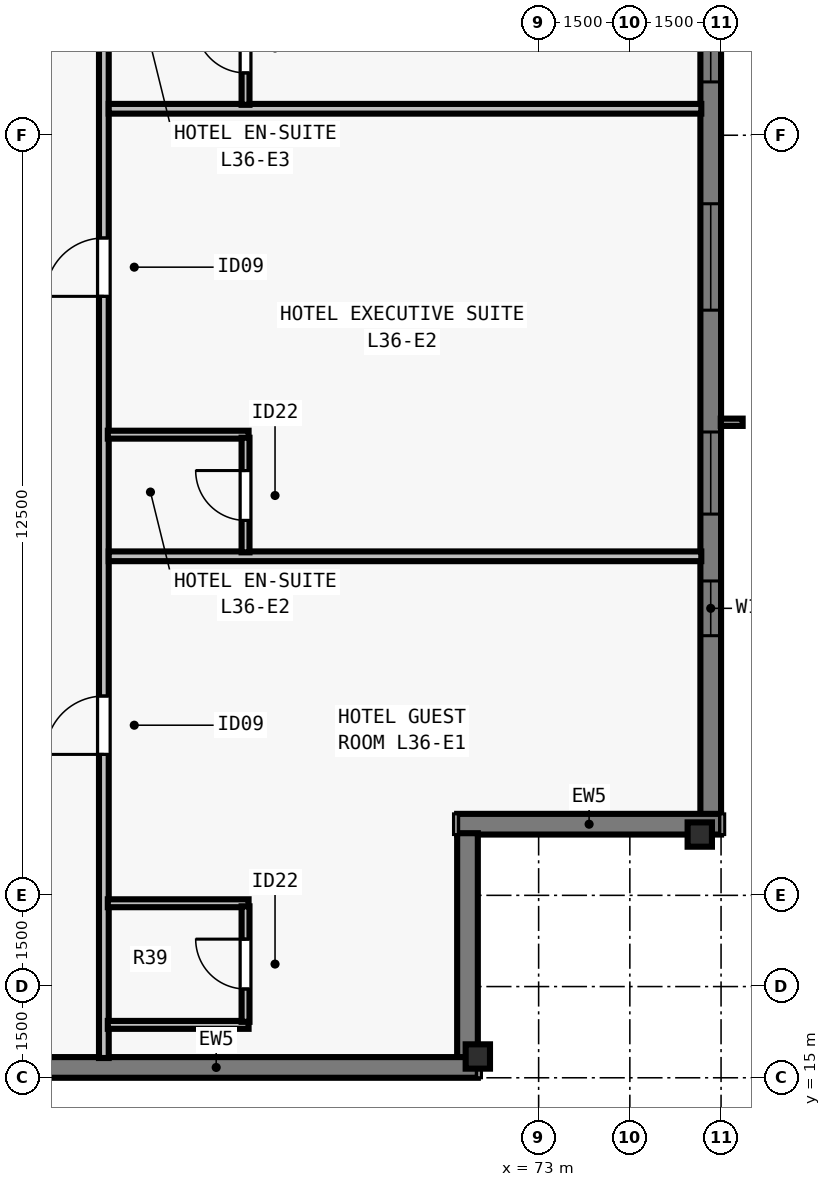
"""IFC4 building model, lengths in metres.
Left out: names, types, materials, properties, quantities, classifications, styles, units other than length and angle.
Written with IfcOpenShell. Run it as: python <this file> out.ifc"""

import sys

from ifc_helpers import new_model, si_unit, direction, frame, frame_2d, origin, origin_2d, place, context, subcontext, project, spatial, rectangle, i_section, extrude, element, fill, save


model = new_model("IFC4")
c1 = context("Model", 3, precision=1e-05, world=origin(), true_north=direction((0.0, 1.0)))
c2 = subcontext(c1, "Body", "Model", "MODEL_VIEW")
j1 = project(units=[si_unit("LENGTHUNIT", "METRE"), si_unit("PLANEANGLEUNIT", "RADIAN")], contexts=[c1])
p1 = place(None, origin())
s1 = spatial("IfcSite", under=j1, at=p1, CompositionType="ELEMENT")
p2 = place(p1, origin())
s2 = spatial("IfcBuilding", under=s1, at=p2, CompositionType="ELEMENT")
p3 = place(p2, frame((0.0, 0.0, 134.0)))
s3 = spatial("IfcBuildingStorey", under=s2, at=p3, CompositionType="ELEMENT", Elevation=134.0)
for number, where, z_axis, x_axis in (
    (1, (72.0, 15.35, 0.0), (0.0, 0.0, 1.0), (1.0, 0.0, 0.0)),
    (2, (75.65, 19.0, 0.0), (0.0, 0.0, 1.0), (0.0, 1.0, 0.0)),
):
    element("IfcColumn", number, at=place(p3, frame(where, z_axis=z_axis, x_axis=x_axis)), inside=s3, PredefinedType="COLUMN", context=c2, shape_type="SweptSolid", body=[
        extrude(i_section(OverallWidth=0.4, OverallDepth=0.4, WebThickness=0.022, FlangeThickness=0.036, at=origin_2d()), origin(), (0.0, 0.0, 1.0), 3.5),
    ])
p4 = place(p3, frame((75.83, 59.0, 0.0), z_axis=(0.0, 0.0, 1.0), x_axis=(0.0, -1.0, 0.0)))
e3 = element("IfcWall", 3, at=p4, inside=s3, PredefinedType="SOLIDWALL", context=c2, shape_type="SweptSolid", body=[
    extrude(rectangle(XDim=39.682, YDim=0.34, at=frame_2d((19.841, 0.0))), origin(), (0.0, 0.0, 1.0), 3.28),
])
p5 = place(p4, frame((4.952, 0.0, 0.8)))
e4 = element("IfcOpeningElement", 4, at=p5, cuts=e3, PredefinedType="OPENING", context=c2, shape_type="SweptSolid", body=[
    extrude(rectangle(XDim=1.35, YDim=1.66, at=frame_2d((0.675, 0.83))), frame((0.0, 0.18, 0.0), z_axis=(0.0, -1.0, 0.0), x_axis=(1.0, 0.0, 0.0)), (0.0, 0.0, 1.0), 0.36),
])
p6 = place(p4, frame((8.305, 0.0, 0.8)))
e5 = element("IfcOpeningElement", 5, at=p6, cuts=e3, PredefinedType="OPENING", context=c2, shape_type="SweptSolid", body=[
    extrude(rectangle(XDim=1.75, YDim=1.66, at=frame_2d((0.875, 0.83))), frame((0.0, 0.18, 0.0), z_axis=(0.0, -1.0, 0.0), x_axis=(1.0, 0.0, 0.0)), (0.0, 0.0, 1.0), 0.36),
])
p7 = place(p4, frame((12.909, 0.0, 0.8)))
e6 = element("IfcOpeningElement", 6, at=p7, cuts=e3, PredefinedType="OPENING", context=c2, shape_type="SweptSolid", body=[
    extrude(rectangle(XDim=1.35, YDim=1.66, at=frame_2d((0.675, 0.83))), frame((0.0, 0.18, 0.0), z_axis=(0.0, -1.0, 0.0), x_axis=(1.0, 0.0, 0.0)), (0.0, 0.0, 1.0), 0.36),
])
p8 = place(p4, frame((16.262, 0.0, 0.8)))
e7 = element("IfcOpeningElement", 7, at=p8, cuts=e3, PredefinedType="OPENING", context=c2, shape_type="SweptSolid", body=[
    extrude(rectangle(XDim=1.75, YDim=1.66, at=frame_2d((0.875, 0.83))), frame((0.0, 0.18, 0.0), z_axis=(0.0, -1.0, 0.0), x_axis=(1.0, 0.0, 0.0)), (0.0, 0.0, 1.0), 0.36),
])
p9 = place(p4, frame((20.016, 0.0, 0.8)))
e8 = element("IfcOpeningElement", 8, at=p9, cuts=e3, PredefinedType="OPENING", context=c2, shape_type="SweptSolid", body=[
    extrude(rectangle(XDim=1.35, YDim=1.66, at=frame_2d((0.675, 0.83))), frame((0.0, 0.18, 0.0), z_axis=(0.0, -1.0, 0.0), x_axis=(1.0, 0.0, 0.0)), (0.0, 0.0, 1.0), 0.36),
])
p10 = place(p4, frame((22.07, 0.0, 0.8)))
e9 = element("IfcOpeningElement", 9, at=p10, cuts=e3, PredefinedType="OPENING", context=c2, shape_type="SweptSolid", body=[
    extrude(rectangle(XDim=1.75, YDim=1.66, at=frame_2d((0.875, 0.83))), frame((0.0, 0.18, 0.0), z_axis=(0.0, -1.0, 0.0), x_axis=(1.0, 0.0, 0.0)), (0.0, 0.0, 1.0), 0.36),
])
p11 = place(p4, frame((26.273, 0.0, 0.8)))
e10 = element("IfcOpeningElement", 10, at=p11, cuts=e3, PredefinedType="OPENING", context=c2, shape_type="SweptSolid", body=[
    extrude(rectangle(XDim=1.35, YDim=1.66, at=frame_2d((0.675, 0.83))), frame((0.0, 0.18, 0.0), z_axis=(0.0, -1.0, 0.0), x_axis=(1.0, 0.0, 0.0)), (0.0, 0.0, 1.0), 0.36),
])
p12 = place(p4, frame((29.627, 0.0, 0.8)))
e11 = element("IfcOpeningElement", 11, at=p12, cuts=e3, PredefinedType="OPENING", context=c2, shape_type="SweptSolid", body=[
    extrude(rectangle(XDim=1.75, YDim=1.66, at=frame_2d((0.875, 0.83))), frame((0.0, 0.18, 0.0), z_axis=(0.0, -1.0, 0.0), x_axis=(1.0, 0.0, 0.0)), (0.0, 0.0, 1.0), 0.36),
])
p13 = place(p4, frame((33.38, 0.0, 0.8)))
e12 = element("IfcOpeningElement", 12, at=p13, cuts=e3, PredefinedType="OPENING", context=c2, shape_type="SweptSolid", body=[
    extrude(rectangle(XDim=1.35, YDim=1.66, at=frame_2d((0.675, 0.83))), frame((0.0, 0.18, 0.0), z_axis=(0.0, -1.0, 0.0), x_axis=(1.0, 0.0, 0.0)), (0.0, 0.0, 1.0), 0.36),
])
p14 = place(p4, frame((35.83, 0.0, 0.8)))
e13 = element("IfcOpeningElement", 13, at=p14, cuts=e3, PredefinedType="OPENING", context=c2, shape_type="SweptSolid", body=[
    extrude(rectangle(XDim=0.9, YDim=1.66, at=frame_2d((0.45, 0.83))), frame((0.0, 0.18, 0.0), z_axis=(0.0, -1.0, 0.0), x_axis=(1.0, 0.0, 0.0)), (0.0, 0.0, 1.0), 0.36),
])
p15 = place(p3, frame((76.0, 19.17, 0.0), z_axis=(0.0, 0.0, 1.0), x_axis=(-1.0, 0.0, 0.0)))
e14 = element("IfcWall", 14, at=p15, inside=s3, PredefinedType="SOLIDWALL", context=c2, shape_type="SweptSolid", body=[
    extrude(rectangle(XDim=4.34, YDim=0.34, at=frame_2d((2.17, 0.0))), origin(), (0.0, 0.0, 1.0), 3.28),
])
p16 = place(p3, frame((71.83, 19.022, 0.0), z_axis=(0.0, 0.0, 1.0), x_axis=(0.0, -1.0, 0.0)))
e15 = element("IfcWall", 15, at=p16, inside=s3, PredefinedType="SOLIDWALL", context=c2, shape_type="SweptSolid", body=[
    extrude(rectangle(XDim=3.704, YDim=0.34, at=frame_2d((1.852, 0.0))), origin(), (0.0, 0.0, 1.0), 3.28),
])
p17 = place(p3, frame((72.0, 15.17, 0.0), z_axis=(0.0, 0.0, 1.0), x_axis=(-1.0, 0.0, 0.0)))
e16 = element("IfcWall", 16, at=p17, inside=s3, PredefinedType="SOLIDWALL", context=c2, shape_type="SweptSolid", body=[
    extrude(rectangle(XDim=39.682, YDim=0.34, at=frame_2d((19.841, 0.0))), origin(), (0.0, 0.0, 1.0), 3.28),
])
p18 = place(p17, frame((8.755, 0.0, 0.8)))
e17 = element("IfcOpeningElement", 17, at=p18, cuts=e16, PredefinedType="OPENING", context=c2, shape_type="SweptSolid", body=[
    extrude(rectangle(XDim=1.75, YDim=1.66, at=frame_2d((0.875, 0.83))), frame((0.0, 0.18, 0.0), z_axis=(0.0, -1.0, 0.0), x_axis=(1.0, 0.0, 0.0)), (0.0, 0.0, 1.0), 0.36),
])
p19 = place(p17, frame((12.059, 0.0, 0.8)))
e18 = element("IfcOpeningElement", 18, at=p19, cuts=e16, PredefinedType="OPENING", context=c2, shape_type="SweptSolid", body=[
    extrude(rectangle(XDim=1.35, YDim=1.66, at=frame_2d((0.675, 0.83))), frame((0.0, 0.18, 0.0), z_axis=(0.0, -1.0, 0.0), x_axis=(1.0, 0.0, 0.0)), (0.0, 0.0, 1.0), 0.36),
])
p20 = place(p17, frame((16.262, 0.0, 0.8)))
e19 = element("IfcOpeningElement", 19, at=p20, cuts=e16, PredefinedType="OPENING", context=c2, shape_type="SweptSolid", body=[
    extrude(rectangle(XDim=1.75, YDim=1.66, at=frame_2d((0.875, 0.83))), frame((0.0, 0.18, 0.0), z_axis=(0.0, -1.0, 0.0), x_axis=(1.0, 0.0, 0.0)), (0.0, 0.0, 1.0), 0.36),
])
p21 = place(p17, frame((19.166, 0.0, 0.8)))
e20 = element("IfcOpeningElement", 20, at=p21, cuts=e16, PredefinedType="OPENING", context=c2, shape_type="SweptSolid", body=[
    extrude(rectangle(XDim=1.35, YDim=1.66, at=frame_2d((0.675, 0.83))), frame((0.0, 0.18, 0.0), z_axis=(0.0, -1.0, 0.0), x_axis=(1.0, 0.0, 0.0)), (0.0, 0.0, 1.0), 0.36),
])
p22 = place(p17, frame((21.27, 0.0, 0.8)))
e21 = element("IfcOpeningElement", 21, at=p22, cuts=e16, PredefinedType="OPENING", context=c2, shape_type="SweptSolid", body=[
    extrude(rectangle(XDim=1.75, YDim=1.66, at=frame_2d((0.875, 0.83))), frame((0.0, 0.18, 0.0), z_axis=(0.0, -1.0, 0.0), x_axis=(1.0, 0.0, 0.0)), (0.0, 0.0, 1.0), 0.36),
])
p23 = place(p17, frame((26.273, 0.0, 0.8)))
e22 = element("IfcOpeningElement", 22, at=p23, cuts=e16, PredefinedType="OPENING", context=c2, shape_type="SweptSolid", body=[
    extrude(rectangle(XDim=1.35, YDim=1.66, at=frame_2d((0.675, 0.83))), frame((0.0, 0.18, 0.0), z_axis=(0.0, -1.0, 0.0), x_axis=(1.0, 0.0, 0.0)), (0.0, 0.0, 1.0), 0.36),
])
p24 = place(p17, frame((28.377, 0.0, 0.8)))
e23 = element("IfcOpeningElement", 23, at=p24, cuts=e16, PredefinedType="OPENING", context=c2, shape_type="SweptSolid", body=[
    extrude(rectangle(XDim=1.75, YDim=1.66, at=frame_2d((0.875, 0.83))), frame((0.0, 0.18, 0.0), z_axis=(0.0, -1.0, 0.0), x_axis=(1.0, 0.0, 0.0)), (0.0, 0.0, 1.0), 0.36),
])
p25 = place(p17, frame((32.93, 0.0, 0.8)))
e24 = element("IfcOpeningElement", 24, at=p25, cuts=e16, PredefinedType="OPENING", context=c2, shape_type="SweptSolid", body=[
    extrude(rectangle(XDim=1.35, YDim=1.66, at=frame_2d((0.675, 0.83))), frame((0.0, 0.18, 0.0), z_axis=(0.0, -1.0, 0.0), x_axis=(1.0, 0.0, 0.0)), (0.0, 0.0, 1.0), 0.36),
])
p26 = place(p3, frame((65.85, 15.325, 0.0), z_axis=(0.0, 0.0, 1.0), x_axis=(0.0, 1.0, 0.0)))
e25 = element("IfcWall", 25, at=p26, inside=s3, PredefinedType="PARTITIONING", context=c2, shape_type="SweptSolid", body=[
    extrude(rectangle(XDim=47.35, YDim=0.16, at=frame_2d((23.675, 0.0))), origin(), (0.0, 0.0, 1.0), 2.555),
])
p27 = place(p26, frame((4.993, 0.0, 0.0)))
e26 = element("IfcOpeningElement", 26, at=p27, cuts=e25, PredefinedType="OPENING", context=c2, shape_type="SweptSolid", body=[
    extrude(rectangle(XDim=0.96, YDim=2.15, at=frame_2d((0.48, 1.075))), frame((0.0, 0.09, 0.0), z_axis=(0.0, -1.0, 0.0), x_axis=(1.0, 0.0, 0.0)), (0.0, 0.0, 1.0), 0.18),
])
p28 = place(p26, frame((12.525, 0.0, 0.0)))
e27 = element("IfcOpeningElement", 27, at=p28, cuts=e25, PredefinedType="OPENING", context=c2, shape_type="SweptSolid", body=[
    extrude(rectangle(XDim=0.96, YDim=2.15, at=frame_2d((0.48, 1.075))), frame((0.0, 0.09, 0.0), z_axis=(0.0, -1.0, 0.0), x_axis=(1.0, 0.0, 0.0)), (0.0, 0.0, 1.0), 0.18),
])
p29 = place(p26, frame((20.385, 0.0, 0.0)))
e28 = element("IfcOpeningElement", 28, at=p29, cuts=e25, PredefinedType="OPENING", context=c2, shape_type="SweptSolid", body=[
    extrude(rectangle(XDim=0.96, YDim=2.15, at=frame_2d((0.48, 1.075))), frame((0.0, 0.09, 0.0), z_axis=(0.0, -1.0, 0.0), x_axis=(1.0, 0.0, 0.0)), (0.0, 0.0, 1.0), 0.18),
])
p30 = place(p26, frame((28.246, 0.0, 0.0)))
e29 = element("IfcOpeningElement", 29, at=p30, cuts=e25, PredefinedType="OPENING", context=c2, shape_type="SweptSolid", body=[
    extrude(rectangle(XDim=0.96, YDim=2.15, at=frame_2d((0.48, 1.075))), frame((0.0, 0.09, 0.0), z_axis=(0.0, -1.0, 0.0), x_axis=(1.0, 0.0, 0.0)), (0.0, 0.0, 1.0), 0.18),
])
p31 = place(p26, frame((36.105, 0.0, 0.0)))
e30 = element("IfcOpeningElement", 30, at=p31, cuts=e25, PredefinedType="OPENING", context=c2, shape_type="SweptSolid", body=[
    extrude(rectangle(XDim=0.96, YDim=2.15, at=frame_2d((0.48, 1.075))), frame((0.0, 0.09, 0.0), z_axis=(0.0, -1.0, 0.0), x_axis=(1.0, 0.0, 0.0)), (0.0, 0.0, 1.0), 0.18),
])
p32 = place(p26, frame((44.068, 0.0, 0.0)))
e31 = element("IfcOpeningElement", 31, at=p32, cuts=e25, PredefinedType="OPENING", context=c2, shape_type="SweptSolid", body=[
    extrude(rectangle(XDim=0.96, YDim=2.15, at=frame_2d((0.48, 1.075))), frame((0.0, 0.09, 0.0), z_axis=(0.0, -1.0, 0.0), x_axis=(1.0, 0.0, 0.0)), (0.0, 0.0, 1.0), 0.18),
])
for number, where, z_axis, x_axis in (
    (32, (65.915, 15.87, 0.0), (0.0, 0.0, 1.0), (1.0, 0.0, 0.0)),
    (33, (65.915, 17.87, 0.0), (0.0, 0.0, 1.0), (1.0, 0.0, 0.0)),
):
    element("IfcWall", number, at=place(p3, frame(where, z_axis=z_axis, x_axis=x_axis)), inside=s3, PredefinedType="PLUMBINGWALL", context=c2, shape_type="SweptSolid", body=[
        extrude(rectangle(XDim=2.315, YDim=0.13, at=frame_2d((1.157, 0.0))), origin(), (0.0, 0.0, 1.0), 3.28),
    ])
p33 = place(p3, frame((68.18, 15.92, 0.0), z_axis=(0.0, 0.0, 1.0), x_axis=(0.0, 1.0, 0.0)))
e34 = element("IfcWall", 34, at=p33, inside=s3, PredefinedType="PLUMBINGWALL", context=c2, shape_type="SweptSolid", body=[
    extrude(rectangle(XDim=1.9, YDim=0.13, at=frame_2d((0.95, 0.0))), origin(), (0.0, 0.0, 1.0), 3.28),
])
p34 = place(p33, frame((0.54, 0.0, 0.0)))
e35 = element("IfcOpeningElement", 35, at=p34, cuts=e34, PredefinedType="OPENING", context=c2, shape_type="SweptSolid", body=[
    extrude(rectangle(XDim=0.82, YDim=2.1, at=frame_2d((0.41, 1.05))), frame((0.0, 0.075, 0.0), z_axis=(0.0, -1.0, 0.0), x_axis=(1.0, 0.0, 0.0)), (0.0, 0.0, 1.0), 0.15),
])
p35 = place(p3, frame((65.93, 23.576, 0.0), z_axis=(0.0, 0.0, 1.0), x_axis=(1.0, 0.0, 0.0)))
e36 = element("IfcWall", 36, at=p35, inside=s3, PredefinedType="PARTITIONING", context=c2, shape_type="SweptSolid", body=[
    extrude(rectangle(XDim=9.745, YDim=0.16, at=frame_2d((4.873, 0.0))), origin(), (0.0, 0.0, 1.0), 2.896),
])
p36 = place(p3, frame((65.915, 25.576, 0.0), z_axis=(0.0, 0.0, 1.0), x_axis=(1.0, 0.0, 0.0)))
e37 = element("IfcWall", 37, at=p36, inside=s3, PredefinedType="PLUMBINGWALL", context=c2, shape_type="SweptSolid", body=[
    extrude(rectangle(XDim=2.315, YDim=0.13, at=frame_2d((1.157, 0.0))), origin(), (0.0, 0.0, 1.0), 2.896),
])
p37 = place(p3, frame((68.18, 23.641, 0.0), z_axis=(0.0, 0.0, 1.0), x_axis=(0.0, 1.0, 0.0)))
e38 = element("IfcWall", 38, at=p37, inside=s3, PredefinedType="PLUMBINGWALL", context=c2, shape_type="SweptSolid", body=[
    extrude(rectangle(XDim=1.885, YDim=0.13, at=frame_2d((0.942, 0.0))), origin(), (0.0, 0.0, 1.0), 3.28),
])
p38 = place(p37, frame((0.525, 0.0, 0.0)))
e39 = element("IfcOpeningElement", 39, at=p38, cuts=e38, PredefinedType="OPENING", context=c2, shape_type="SweptSolid", body=[
    extrude(rectangle(XDim=0.82, YDim=2.1, at=frame_2d((0.41, 1.05))), frame((0.0, 0.075, 0.0), z_axis=(0.0, -1.0, 0.0), x_axis=(1.0, 0.0, 0.0)), (0.0, 0.0, 1.0), 0.15),
])
p39 = place(p3, frame((65.93, 30.935, 0.0), z_axis=(0.0, 0.0, 1.0), x_axis=(1.0, 0.0, 0.0)))
e40 = element("IfcWall", 40, at=p39, inside=s3, PredefinedType="PARTITIONING", context=c2, shape_type="SweptSolid", body=[
    extrude(rectangle(XDim=9.745, YDim=0.16, at=frame_2d((4.873, 0.0))), origin(), (0.0, 0.0, 1.0), 3.28),
])
p40 = place(p3, frame((68.18, 31.0, 0.0), z_axis=(0.0, 0.0, 1.0), x_axis=(0.0, 1.0, 0.0)))
e41 = element("IfcWall", 41, at=p40, inside=s3, PredefinedType="PLUMBINGWALL", context=c2, shape_type="SweptSolid", body=[
    extrude(rectangle(XDim=1.885, YDim=0.13, at=frame_2d((0.942, 0.0))), origin(), (0.0, 0.0, 1.0), 3.28),
])
p41 = place(p40, frame((0.525, 0.0, 0.0)))
e42 = element("IfcOpeningElement", 42, at=p41, cuts=e41, PredefinedType="OPENING", context=c2, shape_type="SweptSolid", body=[
    extrude(rectangle(XDim=0.82, YDim=2.1, at=frame_2d((0.41, 1.05))), frame((0.0, 0.075, 0.0), z_axis=(0.0, -1.0, 0.0), x_axis=(1.0, 0.0, 0.0)), (0.0, 0.0, 1.0), 0.15),
])
p42 = place(p11, origin())
e43 = element("IfcWindow", 43, at=p42, inside=s3, PartitioningType="SINGLE_PANEL", PredefinedType="WINDOW", context=c2, shape_type="SweptSolid", body=[
    extrude(rectangle(XDim=1.35, YDim=1.66, at=frame_2d((0.675, 0.83))), frame((0.0, -0.05, 0.0), z_axis=(0.0, -1.0, 0.0), x_axis=(1.0, 0.0, 0.0)), (0.0, 0.0, 1.0), 0.06),
])
fill(e10, e43)
p43 = place(p12, origin())
e44 = element("IfcWindow", 44, at=p43, inside=s3, PartitioningType="SINGLE_PANEL", PredefinedType="WINDOW", context=c2, shape_type="SweptSolid", body=[
    extrude(rectangle(XDim=1.75, YDim=1.66, at=frame_2d((0.875, 0.83))), frame((0.0, -0.05, 0.0), z_axis=(0.0, -1.0, 0.0), x_axis=(1.0, 0.0, 0.0)), (0.0, 0.0, 1.0), 0.06),
])
fill(e11, e44)
p44 = place(p13, origin())
e45 = element("IfcWindow", 45, at=p44, inside=s3, PartitioningType="SINGLE_PANEL", PredefinedType="WINDOW", context=c2, shape_type="SweptSolid", body=[
    extrude(rectangle(XDim=1.35, YDim=1.66, at=frame_2d((0.675, 0.83))), frame((0.0, -0.05, 0.0), z_axis=(0.0, -1.0, 0.0), x_axis=(1.0, 0.0, 0.0)), (0.0, 0.0, 1.0), 0.06),
])
fill(e12, e45)
p45 = place(p14, origin())
e46 = element("IfcWindow", 46, at=p45, inside=s3, PartitioningType="SINGLE_PANEL", PredefinedType="WINDOW", context=c2, shape_type="SweptSolid", body=[
    extrude(rectangle(XDim=0.9, YDim=1.66, at=frame_2d((0.45, 0.83))), frame((0.0, -0.04, 0.0), z_axis=(0.0, -1.0, 0.0), x_axis=(1.0, 0.0, 0.0)), (0.0, 0.0, 1.0), 0.06),
])
fill(e13, e46)
p46 = place(p34, origin())
e47 = element("IfcDoor", 47, at=p46, inside=s3, OperationType="SINGLE_SWING_RIGHT", PredefinedType="DOOR", context=c2, shape_type="SweptSolid", body=[
    extrude(rectangle(XDim=0.82, YDim=2.1, at=frame_2d((0.41, 1.05))), frame((0.0, 0.025, 0.0), z_axis=(0.0, -1.0, 0.0), x_axis=(1.0, 0.0, 0.0)), (0.0, 0.0, 1.0), 0.05),
])
fill(e35, e47)
p47 = place(p27, origin())
e48 = element("IfcDoor", 48, at=p47, inside=s3, OperationType="SINGLE_SWING_LEFT", PredefinedType="DOOR", context=c2, shape_type="SweptSolid", body=[
    extrude(rectangle(XDim=0.96, YDim=2.15, at=frame_2d((0.48, 1.075))), frame((0.0, 0.025, 0.0), z_axis=(0.0, -1.0, 0.0), x_axis=(1.0, 0.0, 0.0)), (0.0, 0.0, 1.0), 0.05),
])
fill(e26, e48)
p48 = place(p38, origin())
e49 = element("IfcDoor", 49, at=p48, inside=s3, OperationType="SINGLE_SWING_RIGHT", PredefinedType="DOOR", context=c2, shape_type="SweptSolid", body=[
    extrude(rectangle(XDim=0.82, YDim=2.1, at=frame_2d((0.41, 1.05))), frame((0.0, 0.025, 0.0), z_axis=(0.0, -1.0, 0.0), x_axis=(1.0, 0.0, 0.0)), (0.0, 0.0, 1.0), 0.05),
])
fill(e39, e49)
p49 = place(p28, origin())
e50 = element("IfcDoor", 50, at=p49, inside=s3, OperationType="SINGLE_SWING_LEFT", PredefinedType="DOOR", context=c2, shape_type="SweptSolid", body=[
    extrude(rectangle(XDim=0.96, YDim=2.15, at=frame_2d((0.48, 1.075))), frame((0.0, 0.025, 0.0), z_axis=(0.0, -1.0, 0.0), x_axis=(1.0, 0.0, 0.0)), (0.0, 0.0, 1.0), 0.05),
])
fill(e27, e50)
p50 = place(p41, origin())
e51 = element("IfcDoor", 51, at=p50, inside=s3, OperationType="SINGLE_SWING_RIGHT", PredefinedType="DOOR", context=c2, shape_type="SweptSolid", body=[
    extrude(rectangle(XDim=0.82, YDim=2.1, at=frame_2d((0.41, 1.05))), frame((0.0, 0.025, 0.0), z_axis=(0.0, -1.0, 0.0), x_axis=(1.0, 0.0, 0.0)), (0.0, 0.0, 1.0), 0.05),
])
fill(e42, e51)
save(model, sys.argv[1])
